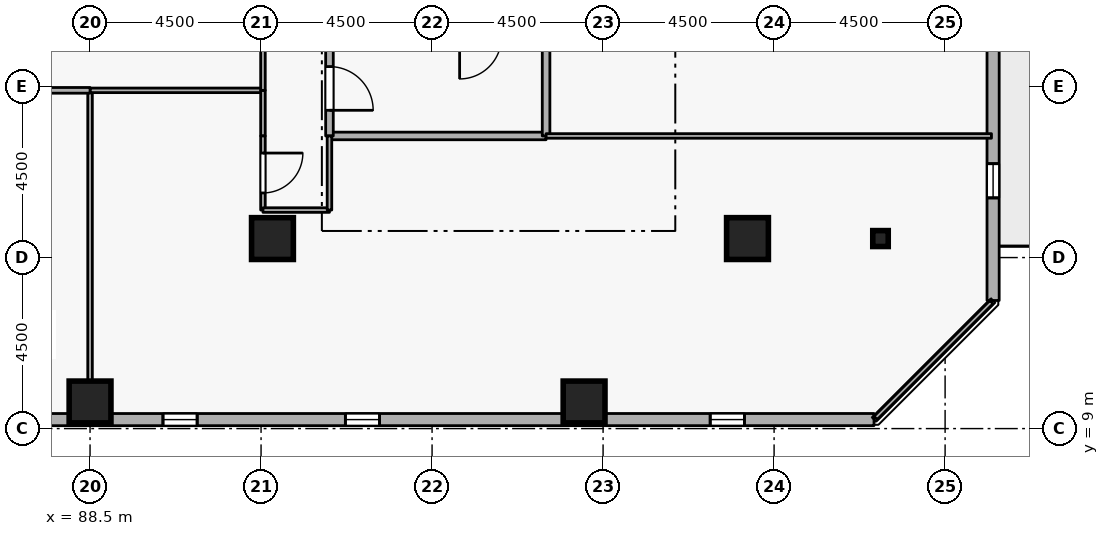
"""IFC4 building model, lengths in metres.
Left out: names, types, materials, properties, quantities, classifications, styles, units other than length and angle.
Written with IfcOpenShell. Run it as: python <this file> out.ifc"""

import sys

from ifc_helpers import new_model, si_unit, direction, frame, frame_2d, origin, origin_2d, place, context, subcontext, project, spatial, rectangle, i_section, extrude, element, fill, save


model = new_model("IFC4")
c1 = context("Model", 3, precision=1e-05, world=origin(), true_north=direction((0.0, 1.0)))
c2 = subcontext(c1, "Body", "Model", "MODEL_VIEW")
j1 = project(units=[si_unit("LENGTHUNIT", "METRE"), si_unit("PLANEANGLEUNIT", "RADIAN")], contexts=[c1])
p1 = place(None, origin())
s1 = spatial("IfcSite", under=j1, at=p1, CompositionType="ELEMENT")
p2 = place(p1, origin())
s2 = spatial("IfcBuilding", under=s1, at=p2, CompositionType="ELEMENT")
p3 = place(p2, frame((0.0, 0.0, 163.5)))
s3 = spatial("IfcBuildingStorey", under=s2, at=p3, CompositionType="ELEMENT", Elevation=163.5)
for number, where, z_axis, x_axis in (
    (1, (105.8, 14.0, 0.0), (0.0, 0.0, 1.0), (1.0, 0.0, 0.0)),
    (2, (101.5, 9.7, 0.0), (0.0, 0.0, 1.0), (1.0, 0.0, 0.0)),
    (3, (88.5, 9.7, 0.0), (0.0, 0.0, 1.0), (1.0, 0.0, 0.0)),
    (4, (93.3, 14.0, 0.0), (0.0, 0.0, 1.0), (1.0, 0.0, 0.0)),
):
    element("IfcColumn", number, at=place(p3, frame(where, z_axis=z_axis, x_axis=x_axis)), inside=s3, PredefinedType="COLUMN", context=c2, shape_type="SweptSolid", body=[
        extrude(rectangle(XDim=1.1, YDim=1.1, at=origin_2d()), origin(), (0.0, 0.0, 1.0), 3.6),
    ])
p4 = place(p3, frame((109.3, 14.0, 0.0), z_axis=(0.0, 0.0, 1.0), x_axis=(1.0, 0.0, 0.0)))
e5 = element("IfcColumn", 5, at=p4, inside=s3, PredefinedType="COLUMN", context=c2, shape_type="SweptSolid", body=[
    extrude(i_section(OverallWidth=0.407, OverallDepth=0.419, WebThickness=0.031, FlangeThickness=0.049, FilletRadius=0.015, at=origin_2d()), origin(), (0.0, 0.0, 1.0), 3.6),
])
p5 = place(p3, frame((73.319, 9.235, 0.0), z_axis=(0.0, 0.0, 1.0), x_axis=(0.999999998513, 5.4540124e-05, 0.0)))
e6 = element("IfcWall", 6, at=p5, inside=s3, PredefinedType="STANDARD", context=c2, shape_type="SweptSolid", body=[
    extrude(rectangle(XDim=35.811, YDim=0.32, at=frame_2d((17.905, 0.0))), origin(), (0.0, 0.0, 1.0), 2.7),
])
p6 = place(p5, frame((7.5, 0.0, 0.72)))
e7 = element("IfcOpeningElement", 7, at=p6, cuts=e6, PredefinedType="OPENING", context=c2, shape_type="SweptSolid", body=[
    extrude(rectangle(XDim=0.9, YDim=1.75, at=frame_2d((0.45, 0.875))), frame((0.0, 0.17, 0.0), z_axis=(0.0, -1.0, 0.0), x_axis=(1.0, 0.0, 0.0)), (0.0, 0.0, 1.0), 0.34),
])
p7 = place(p5, frame((12.3, 0.0, 0.72)))
e8 = element("IfcOpeningElement", 8, at=p7, cuts=e6, PredefinedType="OPENING", context=c2, shape_type="SweptSolid", body=[
    extrude(rectangle(XDim=0.9, YDim=1.75, at=frame_2d((0.45, 0.875))), frame((0.0, 0.17, 0.0), z_axis=(0.0, -1.0, 0.0), x_axis=(1.0, 0.0, 0.0)), (0.0, 0.0, 1.0), 0.34),
])
p8 = place(p5, frame((17.1, 0.0, 0.72)))
e9 = element("IfcOpeningElement", 9, at=p8, cuts=e6, PredefinedType="OPENING", context=c2, shape_type="SweptSolid", body=[
    extrude(rectangle(XDim=0.9, YDim=1.75, at=frame_2d((0.45, 0.875))), frame((0.0, 0.17, 0.0), z_axis=(0.0, -1.0, 0.0), x_axis=(1.0, 0.0, 0.0)), (0.0, 0.0, 1.0), 0.34),
])
p9 = place(p5, frame((21.9, 0.0, 0.72)))
e10 = element("IfcOpeningElement", 10, at=p9, cuts=e6, PredefinedType="OPENING", context=c2, shape_type="SweptSolid", body=[
    extrude(rectangle(XDim=0.9, YDim=1.75, at=frame_2d((0.45, 0.875))), frame((0.0, 0.17, 0.0), z_axis=(0.0, -1.0, 0.0), x_axis=(1.0, 0.0, 0.0)), (0.0, 0.0, 1.0), 0.34),
])
p10 = place(p5, frame((31.5, 0.0, 0.72)))
e11 = element("IfcOpeningElement", 11, at=p10, cuts=e6, PredefinedType="OPENING", context=c2, shape_type="SweptSolid", body=[
    extrude(rectangle(XDim=0.9, YDim=1.75, at=frame_2d((0.45, 0.875))), frame((0.0, 0.17, 0.0), z_axis=(0.0, -1.0, 0.0), x_axis=(1.0, 0.0, 0.0)), (0.0, 0.0, 1.0), 0.34),
])
p11 = place(p3, frame((112.263, 12.371, 0.0), z_axis=(0.0, 0.0, 1.0), x_axis=(5.4540124e-05, 0.999999998513, 0.0)))
e12 = element("IfcWall", 12, at=p11, inside=s3, PredefinedType="STANDARD", context=c2, shape_type="SweptSolid", body=[
    extrude(rectangle(XDim=35.811, YDim=0.32, at=frame_2d((17.905, 0.0))), origin(), (0.0, 0.0, 1.0), 2.7),
])
p12 = place(p11, frame((22.855, 0.0, 0.0)))
e13 = element("IfcOpeningElement", 13, at=p12, cuts=e12, PredefinedType="OPENING", context=c2, shape_type="SweptSolid", body=[
    extrude(rectangle(XDim=1.0, YDim=2.08, at=frame_2d((0.5, 1.04))), frame((0.0, 0.17, 0.0), z_axis=(0.0, -1.0, 0.0), x_axis=(1.0, 0.0, 0.0)), (0.0, 0.0, 1.0), 0.34),
])
p13 = place(p11, frame((2.7, 0.0, 0.72)))
e14 = element("IfcOpeningElement", 14, at=p13, cuts=e12, PredefinedType="OPENING", context=c2, shape_type="SweptSolid", body=[
    extrude(rectangle(XDim=0.9, YDim=1.75, at=frame_2d((0.45, 0.875))), frame((0.0, 0.17, 0.0), z_axis=(0.0, -1.0, 0.0), x_axis=(1.0, 0.0, 0.0)), (0.0, 0.0, 1.0), 0.34),
])
p14 = place(p11, frame((7.5, 0.0, 0.72)))
e15 = element("IfcOpeningElement", 15, at=p14, cuts=e12, PredefinedType="OPENING", context=c2, shape_type="SweptSolid", body=[
    extrude(rectangle(XDim=0.9, YDim=1.75, at=frame_2d((0.45, 0.875))), frame((0.0, 0.17, 0.0), z_axis=(0.0, -1.0, 0.0), x_axis=(1.0, 0.0, 0.0)), (0.0, 0.0, 1.0), 0.34),
])
p15 = place(p11, frame((12.3, 0.0, 0.72)))
e16 = element("IfcOpeningElement", 16, at=p15, cuts=e12, PredefinedType="OPENING", context=c2, shape_type="SweptSolid", body=[
    extrude(rectangle(XDim=0.9, YDim=1.75, at=frame_2d((0.45, 0.875))), frame((0.0, 0.17, 0.0), z_axis=(0.0, -1.0, 0.0), x_axis=(1.0, 0.0, 0.0)), (0.0, 0.0, 1.0), 0.34),
])
p16 = place(p11, frame((17.1, 0.0, 0.72)))
e17 = element("IfcOpeningElement", 17, at=p16, cuts=e12, PredefinedType="OPENING", context=c2, shape_type="SweptSolid", body=[
    extrude(rectangle(XDim=0.9, YDim=1.75, at=frame_2d((0.45, 0.875))), frame((0.0, 0.17, 0.0), z_axis=(0.0, -1.0, 0.0), x_axis=(1.0, 0.0, 0.0)), (0.0, 0.0, 1.0), 0.34),
])
p17 = place(p11, frame((26.7, 0.0, 0.72)))
e18 = element("IfcOpeningElement", 18, at=p17, cuts=e12, PredefinedType="OPENING", context=c2, shape_type="SweptSolid", body=[
    extrude(rectangle(XDim=0.9, YDim=1.75, at=frame_2d((0.45, 0.875))), frame((0.0, 0.17, 0.0), z_axis=(0.0, -1.0, 0.0), x_axis=(1.0, 0.0, 0.0)), (0.0, 0.0, 1.0), 0.34),
])
p18 = place(p11, frame((31.5, 0.0, 0.72)))
e19 = element("IfcOpeningElement", 19, at=p18, cuts=e12, PredefinedType="OPENING", context=c2, shape_type="SweptSolid", body=[
    extrude(rectangle(XDim=0.9, YDim=1.75, at=frame_2d((0.45, 0.875))), frame((0.0, 0.17, 0.0), z_axis=(0.0, -1.0, 0.0), x_axis=(1.0, 0.0, 0.0)), (0.0, 0.0, 1.0), 0.34),
])
p19 = place(p3, frame((94.8, 16.7, 0.0), z_axis=(0.0, 0.0, 1.0), x_axis=(1.0, 0.0, 0.0)))
e20 = element("IfcWall", 20, at=p19, inside=s3, PredefinedType="STANDARD", context=c2, shape_type="SweptSolid", body=[
    extrude(rectangle(XDim=5.7, YDim=0.2, at=frame_2d((2.85, 0.0))), origin(), (0.0, 0.0, 1.0), 3.34),
])
p20 = place(p3, frame((100.5, 16.7, 0.0), z_axis=(0.0, 0.0, 1.0), x_axis=(0.0, 1.0, 0.0)))
e21 = element("IfcWall", 21, at=p20, inside=s3, PredefinedType="STANDARD", context=c2, shape_type="SweptSolid", body=[
    extrude(rectangle(XDim=2.5, YDim=0.2, at=frame_2d((1.25, 0.0))), origin(), (0.0, 0.0, 1.0), 3.34),
])
p21 = place(p3, frame((94.8, 19.2, 0.0), z_axis=(0.0, 0.0, 1.0), x_axis=(0.0, -1.0, 0.0)))
e22 = element("IfcWall", 22, at=p21, inside=s3, PredefinedType="STANDARD", context=c2, shape_type="SweptSolid", body=[
    extrude(rectangle(XDim=2.5, YDim=0.2, at=frame_2d((1.25, 0.0))), origin(), (0.0, 0.0, 1.0), 3.34),
])
p22 = place(p21, frame((0.675, 0.0, 0.0)))
e23 = element("IfcOpeningElement", 23, at=p22, cuts=e22, PredefinedType="OPENING", context=c2, shape_type="SweptSolid", body=[
    extrude(rectangle(XDim=1.15, YDim=2.1, at=frame_2d((0.575, 1.05))), frame((0.0, 0.11, 0.0), z_axis=(0.0, -1.0, 0.0), x_axis=(1.0, 0.0, 0.0)), (0.0, 0.0, 1.0), 0.22),
])
p23 = place(p3, frame((88.5, 9.28, 0.0), z_axis=(0.0, 0.0, 1.0), x_axis=(0.0, 1.0, 0.0)))
e24 = element("IfcWall", 24, at=p23, inside=s3, PredefinedType="PARTITIONING", context=c2, shape_type="SweptSolid", body=[
    extrude(rectangle(XDim=8.62, YDim=0.12, at=frame_2d((4.31, 0.0))), origin(), (0.0, 0.0, 1.0), 2.878),
])
p24 = place(p3, frame((88.5, 17.9, 0.0), z_axis=(0.0, 0.0, 1.0), x_axis=(1.0, 0.0, 0.0)))
e25 = element("IfcWall", 25, at=p24, inside=s3, PredefinedType="PARTITIONING", context=c2, shape_type="SweptSolid", body=[
    extrude(rectangle(XDim=4.55, YDim=0.12, at=frame_2d((2.275, 0.0))), origin(), (0.0, 0.0, 1.0), 3.34),
])
p25 = place(p3, frame((93.05, 17.9, 0.0), z_axis=(0.0, 0.0, 1.0), x_axis=(0.0, -1.0, 0.0)))
e26 = element("IfcWall", 26, at=p25, inside=s3, PredefinedType="PARTITIONING", context=c2, shape_type="SweptSolid", body=[
    extrude(rectangle(XDim=1.2, YDim=0.12, at=frame_2d((0.6, 0.0))), origin(), (0.0, 0.0, 1.0), 3.34),
])
p26 = place(p3, frame((93.05, 16.7, 0.0), z_axis=(0.0, 0.0, 1.0), x_axis=(0.0, -1.0, 0.0)))
e27 = element("IfcWall", 27, at=p26, inside=s3, PredefinedType="PARTITIONING", context=c2, shape_type="SweptSolid", body=[
    extrude(rectangle(XDim=1.95, YDim=0.12, at=frame_2d((0.975, 0.0))), origin(), (0.0, 0.0, 1.0), 3.34),
])
p27 = place(p26, frame((0.45, 0.0, 0.0)))
e28 = element("IfcOpeningElement", 28, at=p27, cuts=e27, PredefinedType="OPENING", context=c2, shape_type="SweptSolid", body=[
    extrude(rectangle(XDim=1.05, YDim=2.1, at=frame_2d((0.525, 1.05))), frame((0.0, 0.07, 0.0), z_axis=(0.0, -1.0, 0.0), x_axis=(1.0, 0.0, 0.0)), (0.0, 0.0, 1.0), 0.14),
])
p28 = place(p3, frame((93.05, 14.75, 0.0), z_axis=(0.0, 0.0, 1.0), x_axis=(1.0, 0.0, 0.0)))
e29 = element("IfcWall", 29, at=p28, inside=s3, PredefinedType="PARTITIONING", context=c2, shape_type="SweptSolid", body=[
    extrude(rectangle(XDim=1.75, YDim=0.12, at=frame_2d((0.875, 0.0))), origin(), (0.0, 0.0, 1.0), 3.34),
])
p29 = place(p3, frame((94.8, 14.75, 0.0), z_axis=(0.0, 0.0, 1.0), x_axis=(0.0, 1.0, 0.0)))
e30 = element("IfcWall", 30, at=p29, inside=s3, PredefinedType="PARTITIONING", context=c2, shape_type="SweptSolid", body=[
    extrude(rectangle(XDim=1.95, YDim=0.12, at=frame_2d((0.975, 0.0))), origin(), (0.0, 0.0, 1.0), 3.34),
])
p30 = place(p3, frame((100.5, 16.7, 0.0), z_axis=(0.0, 0.0, 1.0), x_axis=(1.0, 0.0, 0.0)))
e31 = element("IfcWall", 31, at=p30, inside=s3, PredefinedType="PARTITIONING", context=c2, shape_type="SweptSolid", body=[
    extrude(rectangle(XDim=11.72, YDim=0.12, at=frame_2d((5.86, 0.0))), origin(), (0.0, 0.0, 1.0), 3.34),
])
p31 = place(p3, frame((112.22, 12.329, 0.0), z_axis=(0.0, 0.0, 1.0), x_axis=(-0.707106781187, -0.707106781187, 0.0)))
e32 = element("IfcWall", 32, at=p31, inside=s3, PredefinedType="PARTITIONING", context=c2, shape_type="SweptSolid", body=[
    extrude(rectangle(XDim=4.311, YDim=0.12, at=frame_2d((2.156, 0.0))), origin(), (0.0, 0.0, 1.0), 3.34),
])
p32 = place(p3, frame((83.95, 17.9, 0.0), z_axis=(0.0, 0.0, 1.0), x_axis=(1.0, 0.0, 0.0)))
e33 = element("IfcWall", 33, at=p32, inside=s3, PredefinedType="PARTITIONING", context=c2, shape_type="SweptSolid", body=[
    extrude(rectangle(XDim=4.55, YDim=0.15, at=frame_2d((2.275, 0.0))), origin(), (0.0, 0.0, 1.0), 3.34),
])
p33 = place(p3, frame((93.05, 22.4, 0.0), z_axis=(0.0, 0.0, 1.0), x_axis=(0.0, -1.0, 0.0)))
e34 = element("IfcWall", 34, at=p33, inside=s3, PredefinedType="PARTITIONING", context=c2, shape_type="SweptSolid", body=[
    extrude(rectangle(XDim=4.5, YDim=0.12, at=frame_2d((2.25, 0.0))), origin(), (0.0, 0.0, 1.0), 3.34),
])
p34 = place(p8, origin())
e35 = element("IfcWindow", 35, at=p34, inside=s3, PartitioningType="SINGLE_PANEL", PredefinedType="WINDOW", context=c2, shape_type="SweptSolid", body=[
    extrude(rectangle(XDim=0.9, YDim=1.75, at=frame_2d((0.45, 0.875))), frame((0.0, 0.03, 0.0), z_axis=(0.0, -1.0, 0.0), x_axis=(1.0, 0.0, 0.0)), (0.0, 0.0, 1.0), 0.06),
])
fill(e9, e35)
p35 = place(p9, origin())
e36 = element("IfcWindow", 36, at=p35, inside=s3, PartitioningType="SINGLE_PANEL", PredefinedType="WINDOW", context=c2, shape_type="SweptSolid", body=[
    extrude(rectangle(XDim=0.9, YDim=1.75, at=frame_2d((0.45, 0.875))), frame((0.0, 0.03, 0.0), z_axis=(0.0, -1.0, 0.0), x_axis=(1.0, 0.0, 0.0)), (0.0, 0.0, 1.0), 0.06),
])
fill(e10, e36)
p36 = place(p10, origin())
e37 = element("IfcWindow", 37, at=p36, inside=s3, PartitioningType="SINGLE_PANEL", PredefinedType="WINDOW", context=c2, shape_type="SweptSolid", body=[
    extrude(rectangle(XDim=0.9, YDim=1.75, at=frame_2d((0.45, 0.875))), frame((0.0, 0.03, 0.0), z_axis=(0.0, -1.0, 0.0), x_axis=(1.0, 0.0, 0.0)), (0.0, 0.0, 1.0), 0.06),
])
fill(e11, e37)
p37 = place(p13, origin())
e38 = element("IfcWindow", 38, at=p37, inside=s3, PartitioningType="SINGLE_PANEL", PredefinedType="WINDOW", context=c2, shape_type="SweptSolid", body=[
    extrude(rectangle(XDim=0.9, YDim=1.75, at=frame_2d((0.45, 0.875))), frame((0.0, 0.03, 0.0), z_axis=(0.0, -1.0, 0.0), x_axis=(1.0, 0.0, 0.0)), (0.0, 0.0, 1.0), 0.06),
])
fill(e14, e38)
p38 = place(p22, origin())
e39 = element("IfcDoor", 39, at=p38, inside=s3, OperationType="SINGLE_SWING_RIGHT", PredefinedType="DOOR", context=c2, shape_type="SweptSolid", body=[
    extrude(rectangle(XDim=1.15, YDim=2.1, at=frame_2d((0.575, 1.05))), frame((0.0, 0.025, 0.0), z_axis=(0.0, -1.0, 0.0), x_axis=(1.0, 0.0, 0.0)), (0.0, 0.0, 1.0), 0.05),
])
fill(e23, e39)
p39 = place(p27, origin())
e40 = element("IfcDoor", 40, at=p39, inside=s3, OperationType="SINGLE_SWING_LEFT", PredefinedType="DOOR", context=c2, shape_type="SweptSolid", body=[
    extrude(rectangle(XDim=1.05, YDim=2.1, at=frame_2d((0.525, 1.05))), frame((0.0, 0.025, 0.0), z_axis=(0.0, -1.0, 0.0), x_axis=(1.0, 0.0, 0.0)), (0.0, 0.0, 1.0), 0.05),
])
fill(e28, e40)
save(model, sys.argv[1])
